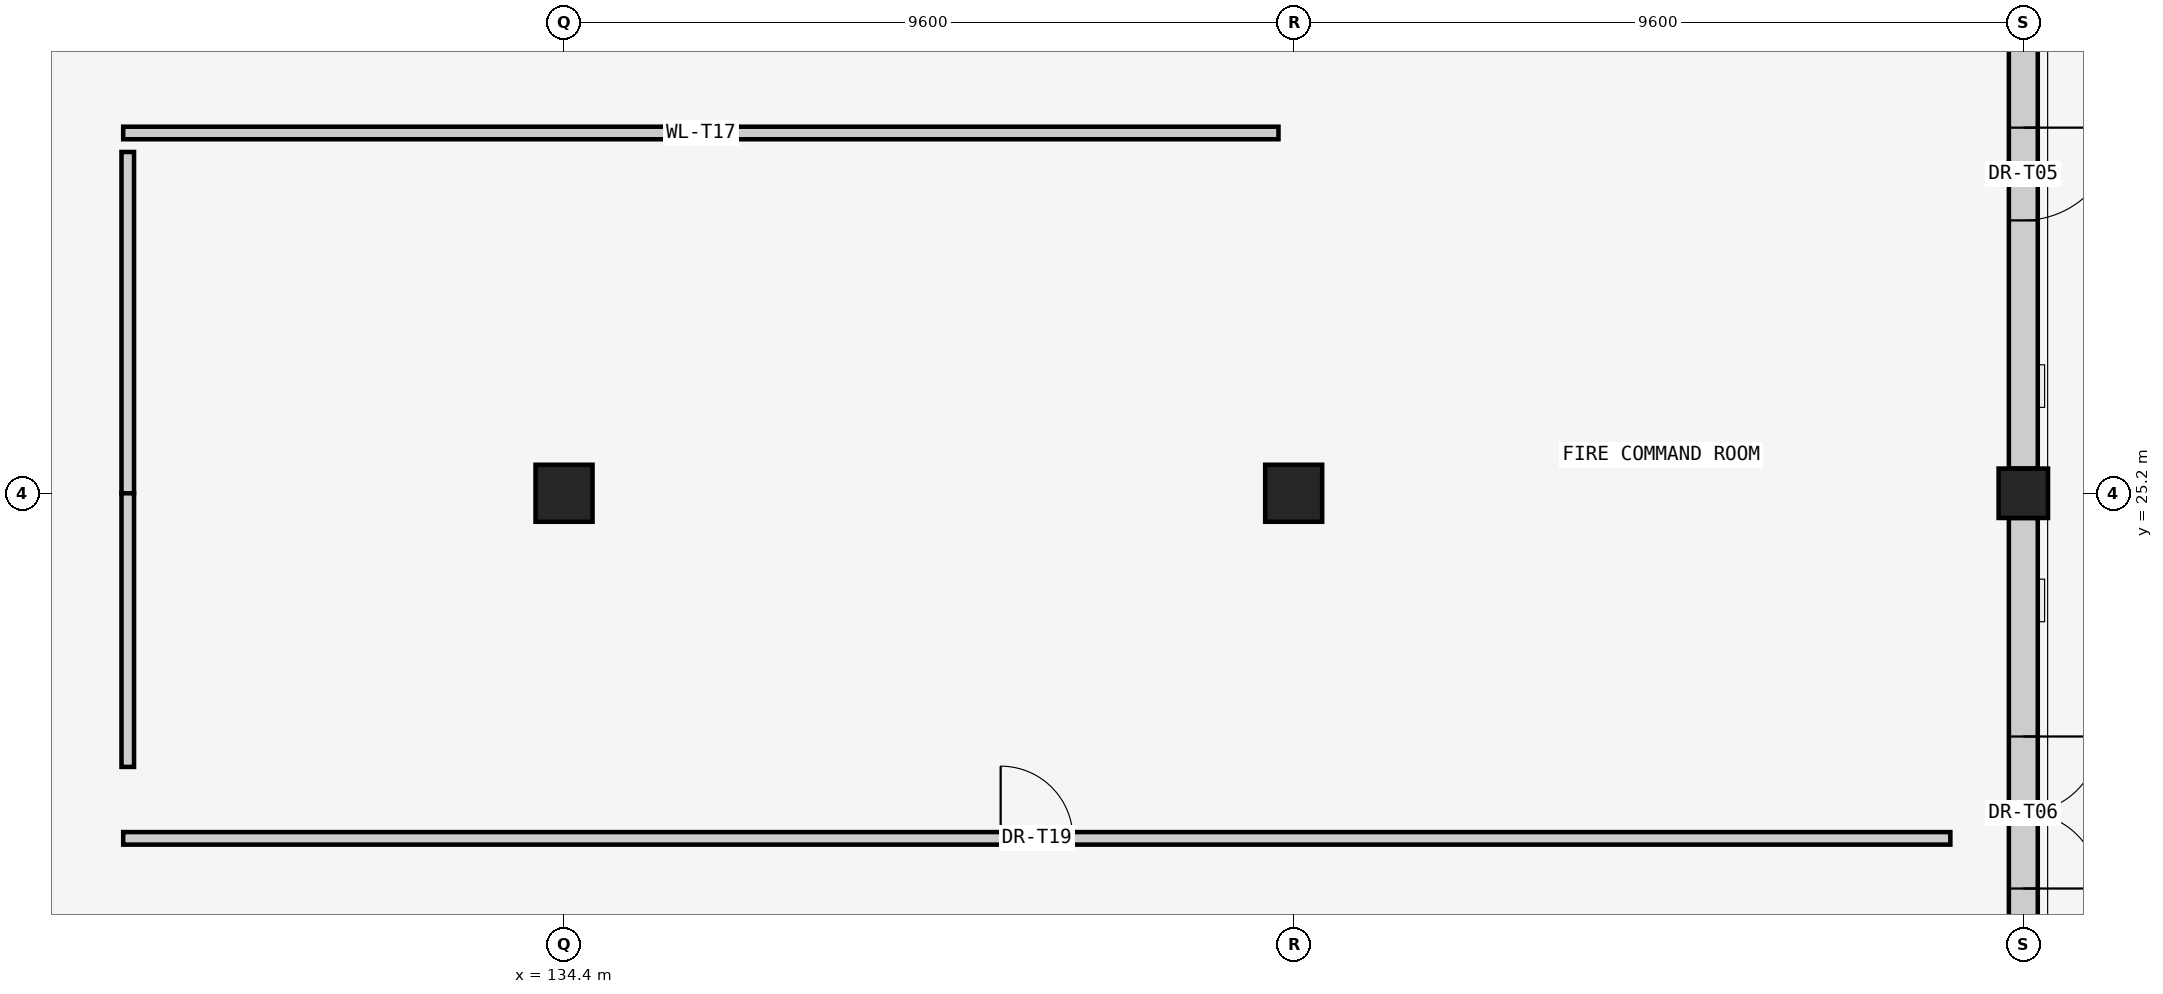
"""IFC4 building model, lengths in metres.
Left out: names, types, materials, properties, quantities, classifications, styles, units other than length and angle.
Written with IfcOpenShell. Run it as: python <this file> out.ifc"""

import sys

from ifc_helpers import new_model, si_unit, direction, frame, frame_2d, origin, origin_2d, place, context, subcontext, project, spatial, rectangle, extrude, element, fill, save


model = new_model("IFC4")
c1 = context("Model", 3, precision=1e-05, world=origin(), true_north=direction((0.0, 1.0)))
c2 = subcontext(c1, "Body", "Model", "MODEL_VIEW")
j1 = project(units=[si_unit("LENGTHUNIT", "METRE"), si_unit("PLANEANGLEUNIT", "RADIAN")], contexts=[c1])
p1 = place(None, origin())
s1 = spatial("IfcSite", under=j1, at=p1, CompositionType="ELEMENT")
p2 = place(p1, origin())
s2 = spatial("IfcBuilding", under=s1, at=p2, CompositionType="ELEMENT")
p3 = place(p2, origin())
s3 = spatial("IfcBuildingStorey", under=s2, at=p3, CompositionType="ELEMENT", Elevation=0.0)
for number, where, z_axis, x_axis in (
    (1, (134.4, 25.2, 0.0), (0.0, 0.0, 1.0), (1.0, 0.0, 0.0)),
    (2, (144.0, 25.2, 0.0), (0.0, 0.0, 1.0), (1.0, 0.0, 0.0)),
):
    element("IfcColumn", number, at=place(p3, frame(where, z_axis=z_axis, x_axis=x_axis)), inside=s3, PredefinedType="COLUMN", context=c2, shape_type="SweptSolid", body=[
        extrude(rectangle(XDim=0.75, YDim=0.75, at=origin_2d()), origin(), (0.0, 0.0, 1.0), 5.12),
    ])
p4 = place(p3, frame((153.6, 25.2, 0.0), z_axis=(0.0, 0.0, 1.0), x_axis=(1.0, 0.0, 0.0)))
e3 = element("IfcColumn", 3, at=p4, inside=s3, PredefinedType="COLUMN", context=c2, shape_type="SweptSolid", body=[
    extrude(rectangle(XDim=0.65, YDim=0.65, at=origin_2d()), origin(), (0.0, 0.0, 1.0), 5.12),
])
p5 = place(p3, frame((153.6, 24.875, 0.0), z_axis=(0.0, 0.0, 1.0), x_axis=(0.0, -1.0, 0.0)))
e4 = element("IfcWall", 4, at=p5, inside=s3, PredefinedType="SOLIDWALL", context=c2, shape_type="SweptSolid", body=[
    extrude(rectangle(XDim=7.75, YDim=0.38, at=frame_2d((3.875, 0.0))), origin(), (0.0, 0.0, 1.0), 4.4),
])
p6 = place(p5, frame((2.875, 0.0, 0.0)))
e5 = element("IfcOpeningElement", 5, at=p6, cuts=e4, PredefinedType="OPENING", context=c2, shape_type="SweptSolid", body=[
    extrude(rectangle(XDim=2.0, YDim=2.25, at=frame_2d((1.0, 1.125))), frame((0.0, 0.2, 0.0), z_axis=(0.0, -1.0, 0.0), x_axis=(1.0, 0.0, 0.0)), (0.0, 0.0, 1.0), 0.4),
])
p7 = place(p3, frame((153.6, 33.275, 0.0), z_axis=(0.0, 0.0, 1.0), x_axis=(0.0, -1.0, 0.0)))
e6 = element("IfcWall", 6, at=p7, inside=s3, PredefinedType="SOLIDWALL", context=c2, shape_type="SweptSolid", body=[
    extrude(rectangle(XDim=7.75, YDim=0.38, at=frame_2d((3.875, 0.0))), origin(), (0.0, 0.0, 1.0), 4.5),
])
p8 = place(p7, frame((3.265, 0.0, 0.0)))
e7 = element("IfcOpeningElement", 7, at=p8, cuts=e6, PredefinedType="OPENING", context=c2, shape_type="SweptSolid", body=[
    extrude(rectangle(XDim=1.22, YDim=2.25, at=frame_2d((0.61, 1.125))), frame((0.0, 0.2, 0.0), z_axis=(0.0, -1.0, 0.0), x_axis=(1.0, 0.0, 0.0)), (0.0, 0.0, 1.0), 0.4),
])
p9 = place(p3, frame((128.6, 29.94, 0.0), z_axis=(0.0, 0.0, 1.0), x_axis=(1.0, 0.0, 0.0)))
e8 = element("IfcWall", 8, at=p9, inside=s3, PredefinedType="PARTITIONING", context=c2, shape_type="SweptSolid", body=[
    extrude(rectangle(XDim=15.2, YDim=0.165, at=frame_2d((7.6, 0.0))), origin(), (0.0, 0.0, 1.0), 4.99),
])
p10 = place(p3, frame((128.66, 25.2, 0.0), z_axis=(0.0, 0.0, 1.0), x_axis=(0.0, 1.0, 0.0)))
e9 = element("IfcWall", 9, at=p10, inside=s3, PredefinedType="PARTITIONING", context=c2, shape_type="SweptSolid", body=[
    extrude(rectangle(XDim=4.49, YDim=0.165, at=frame_2d((2.245, 0.0))), origin(), (0.0, 0.0, 1.0), 4.99),
])
p11 = place(p3, frame((128.66, 21.6, 0.0), z_axis=(0.0, 0.0, 1.0), x_axis=(0.0, 1.0, 0.0)))
e10 = element("IfcWall", 10, at=p11, inside=s3, PredefinedType="PARTITIONING", context=c2, shape_type="SweptSolid", body=[
    extrude(rectangle(XDim=3.6, YDim=0.165, at=frame_2d((1.8, 0.0))), origin(), (0.0, 0.0, 1.0), 4.99),
])
p12 = place(p3, frame((128.6, 20.66, 0.0), z_axis=(0.0, 0.0, 1.0), x_axis=(1.0, 0.0, 0.0)))
e11 = element("IfcWall", 11, at=p12, inside=s3, PredefinedType="PARTITIONING", context=c2, shape_type="SweptSolid", body=[
    extrude(rectangle(XDim=24.04, YDim=0.165, at=frame_2d((12.02, 0.0))), origin(), (0.0, 0.0, 1.0), 4.99),
])
p13 = place(p12, frame((11.545, 0.0, 0.0)))
e12 = element("IfcOpeningElement", 12, at=p13, cuts=e11, PredefinedType="OPENING", context=c2, shape_type="SweptSolid", body=[
    extrude(rectangle(XDim=0.95, YDim=2.15, at=frame_2d((0.475, 1.075))), frame((0.0, 0.093, 0.0), z_axis=(0.0, -1.0, 0.0), x_axis=(1.0, 0.0, 0.0)), (0.0, 0.0, 1.0), 0.185),
])
p14 = place(p6, origin())
e13 = element("IfcDoor", 13, at=p14, inside=s3, OperationType="DOUBLE_DOOR_SINGLE_SWING", PredefinedType="DOOR", context=c2, shape_type="SweptSolid", body=[
    extrude(rectangle(XDim=2.0, YDim=2.25, at=frame_2d((1.0, 1.125))), frame((0.0, 0.025, 0.0), z_axis=(0.0, -1.0, 0.0), x_axis=(1.0, 0.0, 0.0)), (0.0, 0.0, 1.0), 0.05),
])
fill(e5, e13)
p15 = place(p8, origin())
e14 = element("IfcDoor", 14, at=p15, inside=s3, OperationType="SINGLE_SWING_LEFT", PredefinedType="DOOR", context=c2, shape_type="SweptSolid", body=[
    extrude(rectangle(XDim=1.22, YDim=2.25, at=frame_2d((0.61, 1.125))), frame((0.0, 0.025, 0.0), z_axis=(0.0, -1.0, 0.0), x_axis=(1.0, 0.0, 0.0)), (0.0, 0.0, 1.0), 0.05),
])
fill(e7, e14)
p16 = place(p13, origin())
e15 = element("IfcDoor", 15, at=p16, inside=s3, OperationType="SINGLE_SWING_LEFT", PredefinedType="DOOR", context=c2, shape_type="SweptSolid", body=[
    extrude(rectangle(XDim=0.95, YDim=2.15, at=frame_2d((0.475, 1.075))), frame((0.0, 0.025, 0.0), z_axis=(0.0, -1.0, 0.0), x_axis=(1.0, 0.0, 0.0)), (0.0, 0.0, 1.0), 0.05),
])
fill(e12, e15)
save(model, sys.argv[1])
